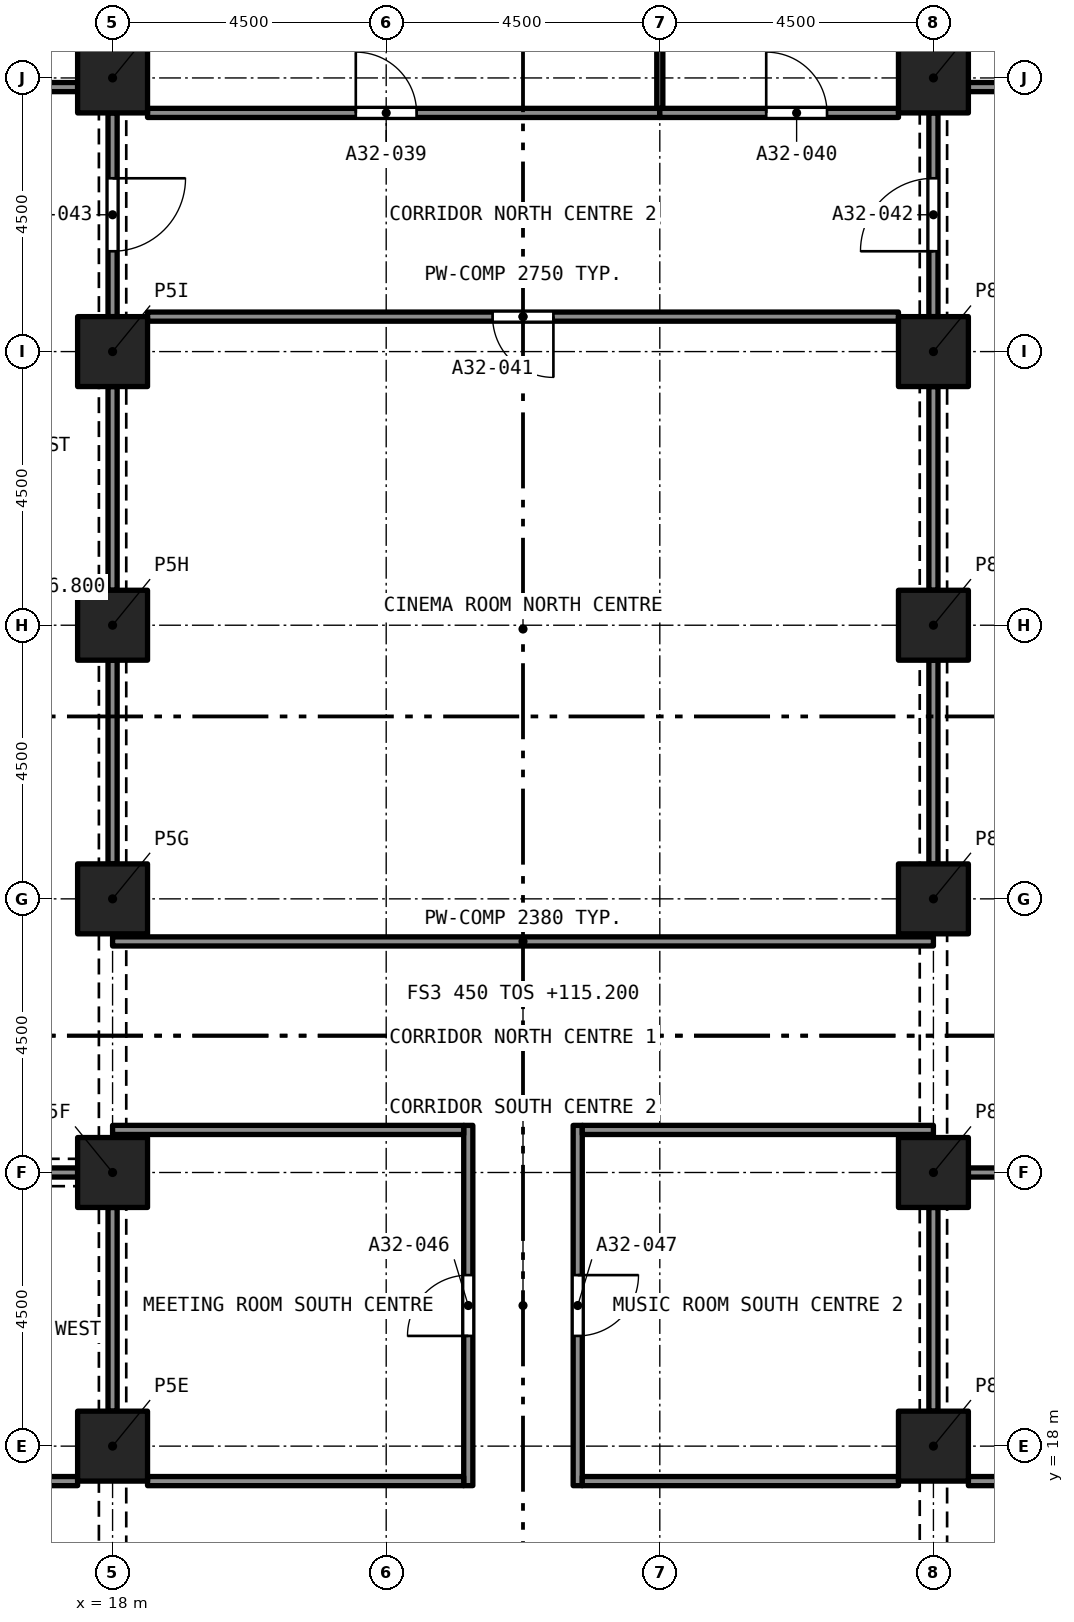
"""IFC4 building model, lengths in metres.
Left out: names, types, materials, properties, quantities, classifications, styles, units other than length and angle.
Written with IfcOpenShell. Run it as: python <this file> out.ifc"""

import sys

from ifc_helpers import new_model, si_unit, direction, frame, frame_2d, origin, origin_2d, place, context, subcontext, project, spatial, rectangle, extrude, element, fill, save


model = new_model("IFC4")
c1 = context("Model", 3, precision=1e-05, world=origin(), true_north=direction((0.0, 1.0)))
c2 = subcontext(c1, "Body", "Model", "MODEL_VIEW")
j1 = project(units=[si_unit("LENGTHUNIT", "METRE"), si_unit("PLANEANGLEUNIT", "RADIAN")], contexts=[c1])
p1 = place(None, origin())
s1 = spatial("IfcSite", under=j1, at=p1, CompositionType="ELEMENT")
p2 = place(p1, origin())
s2 = spatial("IfcBuilding", under=s1, at=p2, CompositionType="ELEMENT")
p3 = place(p2, frame((0.0, 0.0, 115.2)))
s3 = spatial("IfcBuildingStorey", under=s2, at=p3, CompositionType="ELEMENT", Elevation=115.2)
for number, where, z_axis, x_axis in (
    (1, (18.0, 18.0, 0.0), (0.0, 0.0, 1.0), (1.0, 0.0, 0.0)),
    (2, (31.5, 18.0, 0.0), (0.0, 0.0, 1.0), (1.0, 0.0, 0.0)),
    (3, (18.0, 22.5, 0.0), (0.0, 0.0, 1.0), (1.0, 0.0, 0.0)),
    (4, (31.5, 22.5, 0.0), (0.0, 0.0, 1.0), (1.0, 0.0, 0.0)),
    (5, (18.0, 27.0, 0.0), (0.0, 0.0, 1.0), (1.0, 0.0, 0.0)),
    (6, (31.5, 27.0, 0.0), (0.0, 0.0, 1.0), (1.0, 0.0, 0.0)),
    (7, (18.0, 31.5, 0.0), (0.0, 0.0, 1.0), (1.0, 0.0, 0.0)),
    (8, (31.5, 31.5, 0.0), (0.0, 0.0, 1.0), (1.0, 0.0, 0.0)),
    (9, (18.0, 36.0, 0.0), (0.0, 0.0, 1.0), (1.0, 0.0, 0.0)),
    (10, (31.5, 36.0, 0.0), (0.0, 0.0, 1.0), (1.0, 0.0, 0.0)),
    (11, (18.0, 40.5, 0.0), (0.0, 0.0, 1.0), (1.0, 0.0, 0.0)),
    (12, (31.5, 40.5, 0.0), (0.0, 0.0, 1.0), (1.0, 0.0, 0.0)),
):
    element("IfcColumn", number, at=place(p3, frame(where, z_axis=z_axis, x_axis=x_axis)), inside=s3, PredefinedType="COLUMN", context=c2, shape_type="SweptSolid", body=[
        extrude(rectangle(XDim=1.15, YDim=1.15, at=origin_2d()), origin(), (0.0, 0.0, 1.0), 3.2),
    ])
p4 = place(p3, frame((13.35, 40.35, 0.0), z_axis=(0.0, 0.0, 1.0), x_axis=(1.0, 0.0, 0.0)))
e13 = element("IfcWall", 13, at=p4, inside=s3, PredefinedType="PARTITIONING", context=c2, shape_type="SweptSolid", body=[
    extrude(rectangle(XDim=4.075, YDim=0.15, at=frame_2d((2.038, 0.0))), origin(), (0.0, 0.0, 1.0), 2.9),
])
p5 = place(p3, frame((32.075, 40.35, 0.0), z_axis=(0.0, 0.0, 1.0), x_axis=(1.0, 0.0, 0.0)))
e14 = element("IfcWall", 14, at=p5, inside=s3, PredefinedType="PARTITIONING", context=c2, shape_type="SweptSolid", body=[
    extrude(rectangle(XDim=2.425, YDim=0.15, at=frame_2d((1.212, 0.0))), origin(), (0.0, 0.0, 1.0), 2.9),
])
p6 = place(p5, frame((1.175, 0.0, 0.0)))
e15 = element("IfcOpeningElement", 15, at=p6, cuts=e14, PredefinedType="OPENING", context=c2, shape_type="SweptSolid", body=[
    extrude(rectangle(XDim=1.0, YDim=2.1, at=frame_2d((0.5, 1.05))), frame((0.0, 0.085, 0.0), z_axis=(0.0, -1.0, 0.0), x_axis=(1.0, 0.0, 0.0)), (0.0, 0.0, 1.0), 0.17),
])
p7 = place(p3, frame((18.575, 39.925, 0.0), z_axis=(0.0, 0.0, 1.0), x_axis=(1.0, 0.0, 0.0)))
e16 = element("IfcWall", 16, at=p7, inside=s3, PredefinedType="PARTITIONING", context=c2, shape_type="SweptSolid", body=[
    extrude(rectangle(XDim=8.425, YDim=0.15, at=frame_2d((4.212, 0.0))), origin(), (0.0, 0.0, 1.0), 2.75),
])
p8 = place(p7, frame((3.425, 0.0, 0.0)))
e17 = element("IfcOpeningElement", 17, at=p8, cuts=e16, PredefinedType="OPENING", context=c2, shape_type="SweptSolid", body=[
    extrude(rectangle(XDim=1.0, YDim=2.1, at=frame_2d((0.5, 1.05))), frame((0.0, 0.085, 0.0), z_axis=(0.0, -1.0, 0.0), x_axis=(1.0, 0.0, 0.0)), (0.0, 0.0, 1.0), 0.17),
])
p9 = place(p3, frame((27.0, 39.925, 0.0), z_axis=(0.0, 0.0, 1.0), x_axis=(1.0, 0.0, 0.0)))
e18 = element("IfcWall", 18, at=p9, inside=s3, PredefinedType="PARTITIONING", context=c2, shape_type="SweptSolid", body=[
    extrude(rectangle(XDim=3.925, YDim=0.15, at=frame_2d((1.962, 0.0))), origin(), (0.0, 0.0, 1.0), 2.75),
])
p10 = place(p9, frame((1.75, 0.0, 0.0)))
e19 = element("IfcOpeningElement", 19, at=p10, cuts=e18, PredefinedType="OPENING", context=c2, shape_type="SweptSolid", body=[
    extrude(rectangle(XDim=1.0, YDim=2.1, at=frame_2d((0.5, 1.05))), frame((0.0, 0.085, 0.0), z_axis=(0.0, -1.0, 0.0), x_axis=(1.0, 0.0, 0.0)), (0.0, 0.0, 1.0), 0.17),
])
p11 = place(p3, frame((30.925, 36.575, 0.0), z_axis=(0.0, 0.0, 1.0), x_axis=(-1.0, 0.0, 0.0)))
e20 = element("IfcWall", 20, at=p11, inside=s3, PredefinedType="PARTITIONING", context=c2, shape_type="SweptSolid", body=[
    extrude(rectangle(XDim=12.35, YDim=0.15, at=frame_2d((6.175, 0.0))), origin(), (0.0, 0.0, 1.0), 2.75),
])
p12 = place(p11, frame((5.675, 0.0, 0.0)))
e21 = element("IfcOpeningElement", 21, at=p12, cuts=e20, PredefinedType="OPENING", context=c2, shape_type="SweptSolid", body=[
    extrude(rectangle(XDim=1.0, YDim=2.1, at=frame_2d((0.5, 1.05))), frame((0.0, 0.085, 0.0), z_axis=(0.0, -1.0, 0.0), x_axis=(1.0, 0.0, 0.0)), (0.0, 0.0, 1.0), 0.17),
])
p13 = place(p3, frame((31.5, 36.575, 0.0), z_axis=(0.0, 0.0, 1.0), x_axis=(0.0, 1.0, 0.0)))
e22 = element("IfcWall", 22, at=p13, inside=s3, PredefinedType="PARTITIONING", context=c2, shape_type="SweptSolid", body=[
    extrude(rectangle(XDim=3.35, YDim=0.15, at=frame_2d((1.675, 0.0))), origin(), (0.0, 0.0, 1.0), 2.38),
])
p14 = place(p13, frame((1.075, 0.0, 0.0)))
e23 = element("IfcOpeningElement", 23, at=p14, cuts=e22, PredefinedType="OPENING", context=c2, shape_type="SweptSolid", body=[
    extrude(rectangle(XDim=1.2, YDim=2.1, at=frame_2d((0.6, 1.05))), frame((0.0, 0.085, 0.0), z_axis=(0.0, -1.0, 0.0), x_axis=(1.0, 0.0, 0.0)), (0.0, 0.0, 1.0), 0.17),
])
p15 = place(p3, frame((18.0, 39.925, 0.0), z_axis=(0.0, 0.0, 1.0), x_axis=(0.0, -1.0, 0.0)))
e24 = element("IfcWall", 24, at=p15, inside=s3, PredefinedType="PARTITIONING", context=c2, shape_type="SweptSolid", body=[
    extrude(rectangle(XDim=3.35, YDim=0.15, at=frame_2d((1.675, 0.0))), origin(), (0.0, 0.0, 1.0), 2.38),
])
p16 = place(p15, frame((1.075, 0.0, 0.0)))
e25 = element("IfcOpeningElement", 25, at=p16, cuts=e24, PredefinedType="OPENING", context=c2, shape_type="SweptSolid", body=[
    extrude(rectangle(XDim=1.2, YDim=2.1, at=frame_2d((0.6, 1.05))), frame((0.0, 0.085, 0.0), z_axis=(0.0, -1.0, 0.0), x_axis=(1.0, 0.0, 0.0)), (0.0, 0.0, 1.0), 0.17),
])
p17 = place(p3, frame((27.0, 40.0, 0.0), z_axis=(0.0, 0.0, 1.0), x_axis=(0.0, 1.0, 0.0)))
e26 = element("IfcWall", 26, at=p17, inside=s3, PredefinedType="PARTITIONING", context=c2, shape_type="SweptSolid", body=[
    extrude(rectangle(XDim=8.925, YDim=0.1, at=frame_2d((4.462, 0.0))), origin(), (0.0, 0.0, 1.0), 2.75),
])
p18 = place(p3, frame((23.85, 17.35, 0.0), z_axis=(0.0, 0.0, 1.0), x_axis=(0.0, 1.0, 0.0)))
e27 = element("IfcWall", 27, at=p18, inside=s3, PredefinedType="PARTITIONING", context=c2, shape_type="SweptSolid", body=[
    extrude(rectangle(XDim=5.925, YDim=0.15, at=frame_2d((2.962, 0.0))), origin(), (0.0, 0.0, 1.0), 2.75),
])
p19 = place(p18, frame((2.462, 0.0, 0.0)))
e28 = element("IfcOpeningElement", 28, at=p19, cuts=e27, PredefinedType="OPENING", context=c2, shape_type="SweptSolid", body=[
    extrude(rectangle(XDim=1.0, YDim=2.1, at=frame_2d((0.5, 1.05))), frame((0.0, 0.085, 0.0), z_axis=(0.0, -1.0, 0.0), x_axis=(1.0, 0.0, 0.0)), (0.0, 0.0, 1.0), 0.17),
])
p20 = place(p3, frame((25.65, 23.275, 0.0), z_axis=(0.0, 0.0, 1.0), x_axis=(0.0, -1.0, 0.0)))
e29 = element("IfcWall", 29, at=p20, inside=s3, PredefinedType="PARTITIONING", context=c2, shape_type="SweptSolid", body=[
    extrude(rectangle(XDim=5.925, YDim=0.15, at=frame_2d((2.962, 0.0))), origin(), (0.0, 0.0, 1.0), 2.75),
])
p21 = place(p20, frame((2.462, 0.0, 0.0)))
e30 = element("IfcOpeningElement", 30, at=p21, cuts=e29, PredefinedType="OPENING", context=c2, shape_type="SweptSolid", body=[
    extrude(rectangle(XDim=1.0, YDim=2.1, at=frame_2d((0.5, 1.05))), frame((0.0, 0.085, 0.0), z_axis=(0.0, -1.0, 0.0), x_axis=(1.0, 0.0, 0.0)), (0.0, 0.0, 1.0), 0.17),
])
for number, where, z_axis, x_axis in (
    (31, (18.575, 17.425, 0.0), (0.0, 0.0, 1.0), (1.0, 0.0, 0.0)),
    (32, (25.725, 17.425, 0.0), (0.0, 0.0, 1.0), (1.0, 0.0, 0.0)),
):
    element("IfcWall", number, at=place(p3, frame(where, z_axis=z_axis, x_axis=x_axis)), inside=s3, PredefinedType="PARTITIONING", context=c2, shape_type="SweptSolid", body=[
        extrude(rectangle(XDim=5.2, YDim=0.15, at=frame_2d((2.6, 0.0))), origin(), (0.0, 0.0, 1.0), 2.75),
    ])
p22 = place(p3, frame((32.075, 17.425, 0.0), z_axis=(0.0, 0.0, 1.0), x_axis=(1.0, 0.0, 0.0)))
e33 = element("IfcWall", 33, at=p22, inside=s3, PredefinedType="PARTITIONING", context=c2, shape_type="SweptSolid", body=[
    extrude(rectangle(XDim=7.275, YDim=0.15, at=frame_2d((3.638, 0.0))), origin(), (0.0, 0.0, 1.0), 2.9),
])
p23 = place(p22, frame((2.9, 0.0, 0.0)))
e34 = element("IfcOpeningElement", 34, at=p23, cuts=e33, PredefinedType="OPENING", context=c2, shape_type="SweptSolid", body=[
    extrude(rectangle(XDim=0.9, YDim=2.1, at=frame_2d((0.45, 1.05))), frame((0.0, 0.085, 0.0), z_axis=(0.0, -1.0, 0.0), x_axis=(1.0, 0.0, 0.0)), (0.0, 0.0, 1.0), 0.17),
])
p24 = place(p3, frame((10.15, 17.425, 0.0), z_axis=(0.0, 0.0, 1.0), x_axis=(1.0, 0.0, 0.0)))
e35 = element("IfcWall", 35, at=p24, inside=s3, PredefinedType="PARTITIONING", context=c2, shape_type="SweptSolid", body=[
    extrude(rectangle(XDim=7.275, YDim=0.15, at=frame_2d((3.638, 0.0))), origin(), (0.0, 0.0, 1.0), 2.9),
])
p25 = place(p24, frame((3.475, 0.0, 0.0)))
e36 = element("IfcOpeningElement", 36, at=p25, cuts=e35, PredefinedType="OPENING", context=c2, shape_type="SweptSolid", body=[
    extrude(rectangle(XDim=0.9, YDim=2.1, at=frame_2d((0.45, 1.05))), frame((0.0, 0.085, 0.0), z_axis=(0.0, -1.0, 0.0), x_axis=(1.0, 0.0, 0.0)), (0.0, 0.0, 1.0), 0.17),
])
for number, where, z_axis, x_axis in (
    (37, (31.5, 32.075, 0.0), (0.0, 0.0, 1.0), (0.0, 1.0, 0.0)),
    (38, (31.5, 27.575, 0.0), (0.0, 0.0, 1.0), (0.0, 1.0, 0.0)),
    (39, (18.0, 27.575, 0.0), (0.0, 0.0, 1.0), (0.0, 1.0, 0.0)),
    (40, (18.0, 32.075, 0.0), (0.0, 0.0, 1.0), (0.0, 1.0, 0.0)),
):
    element("IfcWall", number, at=place(p3, frame(where, z_axis=z_axis, x_axis=x_axis)), inside=s3, PredefinedType="PARTITIONING", context=c2, shape_type="SweptSolid", body=[
        extrude(rectangle(XDim=3.35, YDim=0.15, at=frame_2d((1.675, 0.0))), origin(), (0.0, 0.0, 1.0), 2.38),
    ])
p26 = place(p3, frame((18.0, 26.3, 0.0), z_axis=(0.0, 0.0, 1.0), x_axis=(1.0, 0.0, 0.0)))
e41 = element("IfcWall", 41, at=p26, inside=s3, PredefinedType="PARTITIONING", context=c2, shape_type="SweptSolid", body=[
    extrude(rectangle(XDim=13.5, YDim=0.15, at=frame_2d((6.75, 0.0))), origin(), (0.0, 0.0, 1.0), 2.38),
])
p27 = place(p3, frame((18.0, 23.2, 0.0), z_axis=(0.0, 0.0, 1.0), x_axis=(1.0, 0.0, 0.0)))
e42 = element("IfcWall", 42, at=p27, inside=s3, PredefinedType="PARTITIONING", context=c2, shape_type="SweptSolid", body=[
    extrude(rectangle(XDim=5.775, YDim=0.15, at=frame_2d((2.887, 0.0))), origin(), (0.0, 0.0, 1.0), 2.75),
])
p28 = place(p3, frame((18.0, 18.575, 0.0), z_axis=(0.0, 0.0, 1.0), x_axis=(0.0, 1.0, 0.0)))
e43 = element("IfcWall", 43, at=p28, inside=s3, PredefinedType="PARTITIONING", context=c2, shape_type="SweptSolid", body=[
    extrude(rectangle(XDim=3.35, YDim=0.15, at=frame_2d((1.675, 0.0))), origin(), (0.0, 0.0, 1.0), 2.38),
])
p29 = place(p3, frame((25.725, 23.2, 0.0), z_axis=(0.0, 0.0, 1.0), x_axis=(1.0, 0.0, 0.0)))
e44 = element("IfcWall", 44, at=p29, inside=s3, PredefinedType="PARTITIONING", context=c2, shape_type="SweptSolid", body=[
    extrude(rectangle(XDim=5.775, YDim=0.15, at=frame_2d((2.887, 0.0))), origin(), (0.0, 0.0, 1.0), 2.75),
])
p30 = place(p3, frame((31.5, 18.575, 0.0), z_axis=(0.0, 0.0, 1.0), x_axis=(0.0, 1.0, 0.0)))
e45 = element("IfcWall", 45, at=p30, inside=s3, PredefinedType="PARTITIONING", context=c2, shape_type="SweptSolid", body=[
    extrude(rectangle(XDim=3.35, YDim=0.15, at=frame_2d((1.675, 0.0))), origin(), (0.0, 0.0, 1.0), 2.38),
])
p31 = place(p3, frame((32.075, 22.5, 0.0), z_axis=(0.0, 0.0, 1.0), x_axis=(1.0, 0.0, 0.0)))
e46 = element("IfcWall", 46, at=p31, inside=s3, PredefinedType="PARTITIONING", context=c2, shape_type="SweptSolid", body=[
    extrude(rectangle(XDim=9.85, YDim=0.15, at=frame_2d((4.925, 0.0))), origin(), (0.0, 0.0, 1.0), 2.9),
])
p32 = place(p3, frame((14.075, 22.5, 0.0), z_axis=(0.0, 0.0, 1.0), x_axis=(1.0, 0.0, 0.0)))
e47 = element("IfcWall", 47, at=p32, inside=s3, PredefinedType="PARTITIONING", context=c2, shape_type="SweptSolid", body=[
    extrude(rectangle(XDim=3.35, YDim=0.15, at=frame_2d((1.675, 0.0))), origin(), (0.0, 0.0, 1.0), 2.38),
])
p33 = place(p8, origin())
e48 = element("IfcDoor", 48, at=p33, inside=s3, OperationType="SINGLE_SWING_LEFT", PredefinedType="DOOR", context=c2, shape_type="SweptSolid", body=[
    extrude(rectangle(XDim=1.0, YDim=2.1, at=frame_2d((0.5, 1.05))), frame((0.0, 0.025, 0.0), z_axis=(0.0, -1.0, 0.0), x_axis=(1.0, 0.0, 0.0)), (0.0, 0.0, 1.0), 0.05),
])
fill(e17, e48)
p34 = place(p10, origin())
e49 = element("IfcDoor", 49, at=p34, inside=s3, OperationType="SINGLE_SWING_RIGHT", PredefinedType="DOOR", context=c2, shape_type="SweptSolid", body=[
    extrude(rectangle(XDim=1.0, YDim=2.1, at=frame_2d((0.5, 1.05))), frame((0.0, 0.025, 0.0), z_axis=(0.0, -1.0, 0.0), x_axis=(1.0, 0.0, 0.0)), (0.0, 0.0, 1.0), 0.05),
])
fill(e19, e49)
p35 = place(p12, origin())
e50 = element("IfcDoor", 50, at=p35, inside=s3, OperationType="SINGLE_SWING_RIGHT", PredefinedType="DOOR", context=c2, shape_type="SweptSolid", body=[
    extrude(rectangle(XDim=1.0, YDim=2.1, at=frame_2d((0.5, 1.05))), frame((0.0, 0.025, 0.0), z_axis=(0.0, -1.0, 0.0), x_axis=(1.0, 0.0, 0.0)), (0.0, 0.0, 1.0), 0.05),
])
fill(e21, e50)
p36 = place(p14, origin())
e51 = element("IfcDoor", 51, at=p36, inside=s3, OperationType="SINGLE_SWING_LEFT", PredefinedType="DOOR", context=c2, shape_type="SweptSolid", body=[
    extrude(rectangle(XDim=1.2, YDim=2.1, at=frame_2d((0.6, 1.05))), frame((0.0, 0.025, 0.0), z_axis=(0.0, -1.0, 0.0), x_axis=(1.0, 0.0, 0.0)), (0.0, 0.0, 1.0), 0.05),
])
fill(e23, e51)
p37 = place(p16, origin())
e52 = element("IfcDoor", 52, at=p37, inside=s3, OperationType="SINGLE_SWING_LEFT", PredefinedType="DOOR", context=c2, shape_type="SweptSolid", body=[
    extrude(rectangle(XDim=1.2, YDim=2.1, at=frame_2d((0.6, 1.05))), frame((0.0, 0.025, 0.0), z_axis=(0.0, -1.0, 0.0), x_axis=(1.0, 0.0, 0.0)), (0.0, 0.0, 1.0), 0.05),
])
fill(e25, e52)
p38 = place(p19, origin())
e53 = element("IfcDoor", 53, at=p38, inside=s3, OperationType="SINGLE_SWING_RIGHT", PredefinedType="DOOR", context=c2, shape_type="SweptSolid", body=[
    extrude(rectangle(XDim=1.0, YDim=2.1, at=frame_2d((0.5, 1.05))), frame((0.0, 0.025, 0.0), z_axis=(0.0, -1.0, 0.0), x_axis=(1.0, 0.0, 0.0)), (0.0, 0.0, 1.0), 0.05),
])
fill(e28, e53)
p39 = place(p21, origin())
e54 = element("IfcDoor", 54, at=p39, inside=s3, OperationType="SINGLE_SWING_RIGHT", PredefinedType="DOOR", context=c2, shape_type="SweptSolid", body=[
    extrude(rectangle(XDim=1.0, YDim=2.1, at=frame_2d((0.5, 1.05))), frame((0.0, 0.025, 0.0), z_axis=(0.0, -1.0, 0.0), x_axis=(1.0, 0.0, 0.0)), (0.0, 0.0, 1.0), 0.05),
])
fill(e30, e54)
save(model, sys.argv[1])
